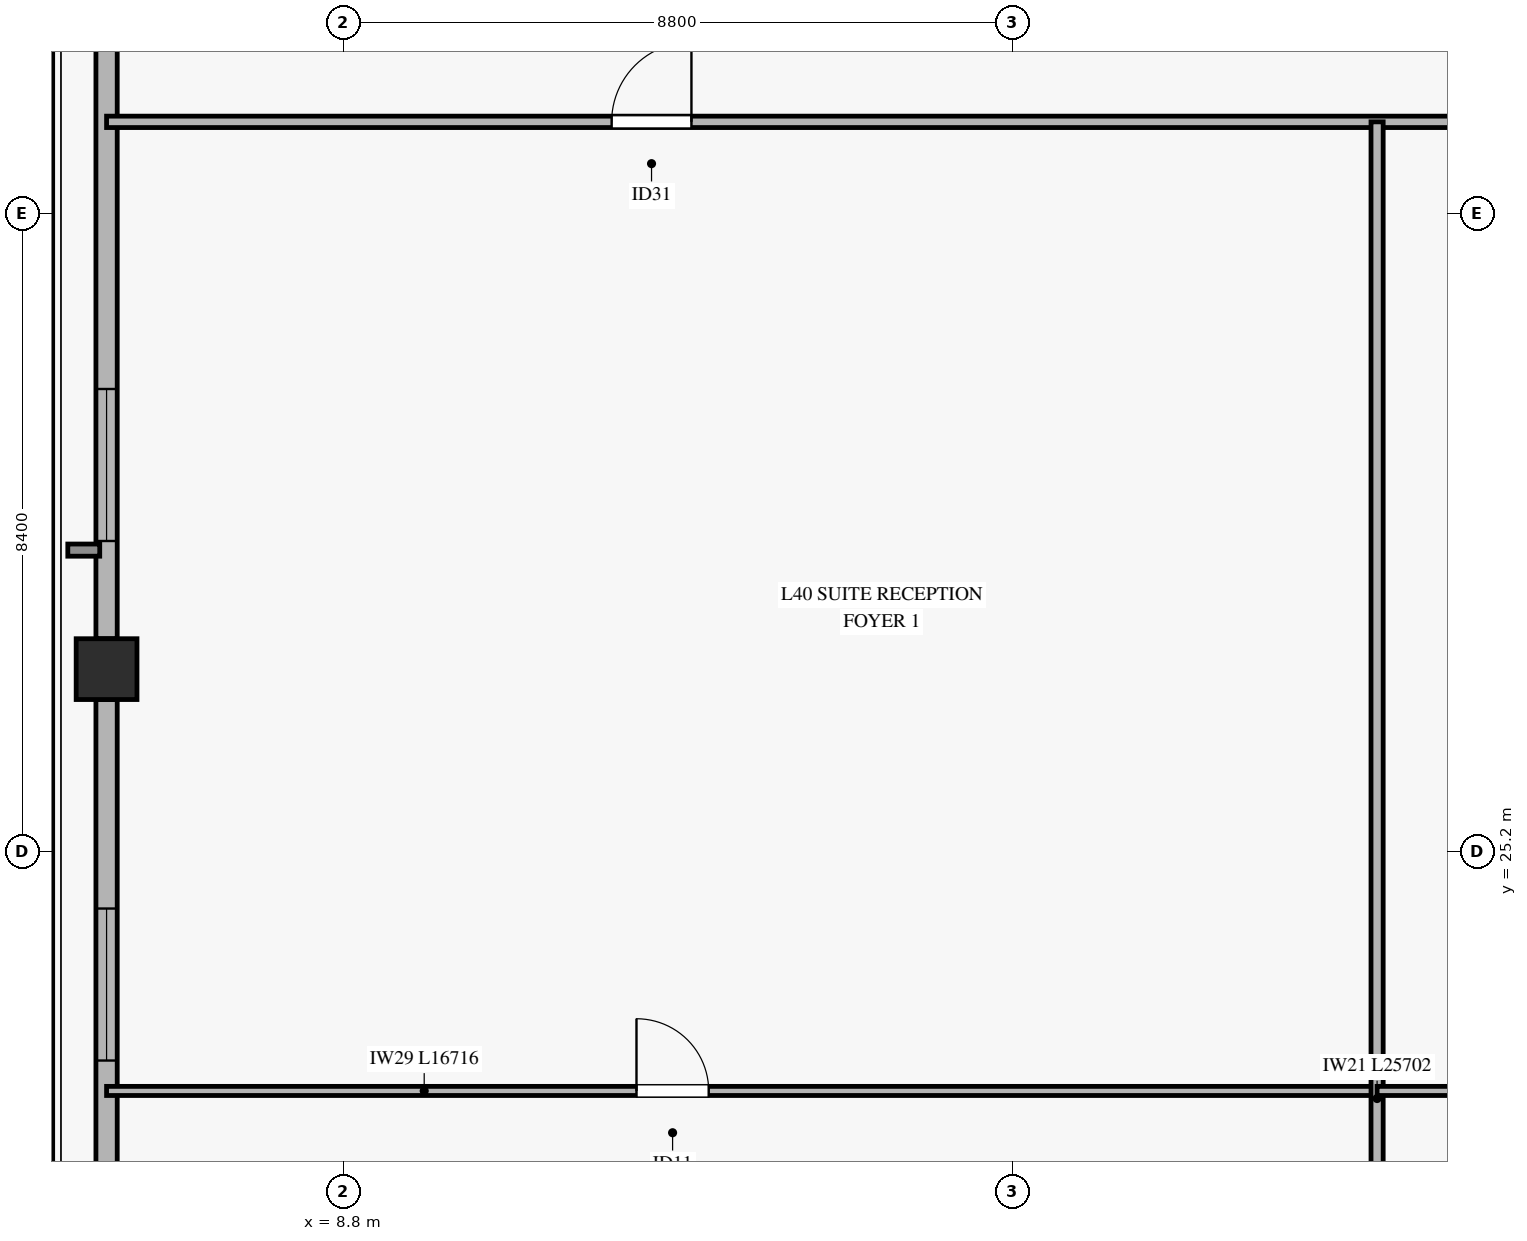
"""IFC4 building model, lengths in metres.
Left out: names, types, materials, properties, quantities, classifications, styles, units other than length and angle.
Written with IfcOpenShell. Run it as: python <this file> out.ifc"""

import sys

from ifc_helpers import new_model, si_unit, direction, frame, frame_2d, origin, origin_2d, place, context, subcontext, project, spatial, rectangle, hollow_rectangle, extrude, source, transform, mapped, element, fill, save


model = new_model("IFC4")
c1 = context("Model", 3, precision=1e-05, world=origin(), true_north=direction((0.0, 1.0)))
c2 = subcontext(c1, "Body", "Model", "MODEL_VIEW")
j1 = project(units=[si_unit("LENGTHUNIT", "METRE"), si_unit("PLANEANGLEUNIT", "RADIAN")], contexts=[c1])
p1 = place(None, origin())
s1 = spatial("IfcSite", under=j1, at=p1, CompositionType="ELEMENT")
p2 = place(p1, origin())
s2 = spatial("IfcBuilding", under=s1, at=p2, CompositionType="ELEMENT")
p3 = place(p2, frame((0.0, 0.0, 163.2)))
s3 = spatial("IfcBuildingStorey", under=s2, at=p3, CompositionType="ELEMENT", Elevation=163.2)
m1 = source(origin(), c2, "Body", "SweptSolid", [
    extrude(hollow_rectangle(XDim=0.8, YDim=0.8, WallThickness=0.036, at=origin_2d()), origin(), (0.0, 0.0, 1.0), 3.27),
])
p4 = place(p3, frame((5.684, 27.599, 0.0), z_axis=(0.0, 0.0, 1.0), x_axis=(1.0, 0.0, 0.0)))
e1 = element("IfcColumn", 1, at=p4, inside=s3, PredefinedType="COLUMN", context=c2, shape_type="MappedRepresentation", body=[
    mapped(m1, transform((0.0, 0.0, 0.0), x_axis=(1.0, 0.0, 0.0), y_axis=(0.0, 1.0, 0.0), z_axis=(0.0, 0.0, 1.0), scale=1.0)),
])
p5 = place(p3, frame((5.684, 12.011, 0.0), z_axis=(0.0, 0.0, 1.0), x_axis=(0.0, 1.0, 0.0)))
e2 = element("IfcWall", 2, at=p5, inside=s3, PredefinedType="SOLIDWALL", context=c2, shape_type="SweptSolid", body=[
    extrude(rectangle(XDim=15.188, YDim=0.28, at=frame_2d((7.594, 0.0))), origin(), (0.0, 0.0, 1.0), 2.75),
])
p6 = place(p5, frame((3.189, 0.0, 0.45)))
e3 = element("IfcOpeningElement", 3, at=p6, cuts=e2, PredefinedType="OPENING", context=c2, shape_type="SweptSolid", body=[
    extrude(rectangle(XDim=2.0, YDim=2.0, at=frame_2d((1.0, 1.0))), frame((0.0, 0.15, 0.0), z_axis=(0.0, -1.0, 0.0), x_axis=(1.0, 0.0, 0.0)), (0.0, 0.0, 1.0), 0.3),
])
p7 = place(p5, frame((10.438, 0.0, 0.45)))
e4 = element("IfcOpeningElement", 4, at=p7, cuts=e2, PredefinedType="OPENING", context=c2, shape_type="SweptSolid", body=[
    extrude(rectangle(XDim=2.0, YDim=2.0, at=frame_2d((1.0, 1.0))), frame((0.0, 0.15, 0.0), z_axis=(0.0, -1.0, 0.0), x_axis=(1.0, 0.0, 0.0)), (0.0, 0.0, 1.0), 0.3),
])
p8 = place(p3, frame((5.684, 27.999, 0.0), z_axis=(0.0, 0.0, 1.0), x_axis=(0.0, 1.0, 0.0)))
e5 = element("IfcWall", 5, at=p8, inside=s3, PredefinedType="SOLIDWALL", context=c2, shape_type="SweptSolid", body=[
    extrude(rectangle(XDim=15.188, YDim=0.28, at=frame_2d((7.594, 0.0))), origin(), (0.0, 0.0, 1.0), 2.75),
])
p9 = place(p8, frame((1.286, 0.0, 0.45)))
e6 = element("IfcOpeningElement", 6, at=p9, cuts=e5, PredefinedType="OPENING", context=c2, shape_type="SweptSolid", body=[
    extrude(rectangle(XDim=2.0, YDim=2.0, at=frame_2d((1.0, 1.0))), frame((0.0, 0.15, 0.0), z_axis=(0.0, -1.0, 0.0), x_axis=(1.0, 0.0, 0.0)), (0.0, 0.0, 1.0), 0.3),
])
p10 = place(p8, frame((11.834, 0.0, 0.45)))
e7 = element("IfcOpeningElement", 7, at=p10, cuts=e5, PredefinedType="OPENING", context=c2, shape_type="SweptSolid", body=[
    extrude(rectangle(XDim=2.0, YDim=2.0, at=frame_2d((1.0, 1.0))), frame((0.0, 0.15, 0.0), z_axis=(0.0, -1.0, 0.0), x_axis=(1.0, 0.0, 0.0)), (0.0, 0.0, 1.0), 0.3),
])
p11 = place(p3, frame((5.684, 34.8, 0.0), z_axis=(0.0, 0.0, 1.0), x_axis=(1.0, 0.0, 0.0)))
e8 = element("IfcWall", 8, at=p11, inside=s3, PredefinedType="PARTITIONING", context=c2, shape_type="SweptSolid", body=[
    extrude(rectangle(XDim=59.032, YDim=0.15, at=frame_2d((29.516, 0.0))), origin(), (0.0, 0.0, 1.0), 2.455),
])
p12 = place(p11, frame((6.645, 0.0, 0.0)))
e9 = element("IfcOpeningElement", 9, at=p12, cuts=e8, PredefinedType="OPENING", context=c2, shape_type="SweptSolid", body=[
    extrude(rectangle(XDim=1.05, YDim=2.15, at=frame_2d((0.525, 1.075))), frame((0.0, 0.085, 0.0), z_axis=(0.0, -1.0, 0.0), x_axis=(1.0, 0.0, 0.0)), (0.0, 0.0, 1.0), 0.17),
])
p13 = place(p11, frame((19.241, 0.0, 0.0)))
e10 = element("IfcOpeningElement", 10, at=p13, cuts=e8, PredefinedType="OPENING", context=c2, shape_type="SweptSolid", body=[
    extrude(rectangle(XDim=1.05, YDim=2.15, at=frame_2d((0.525, 1.075))), frame((0.0, 0.085, 0.0), z_axis=(0.0, -1.0, 0.0), x_axis=(1.0, 0.0, 0.0)), (0.0, 0.0, 1.0), 0.17),
])
p14 = place(p11, frame((25.213, 0.0, 0.0)))
e11 = element("IfcOpeningElement", 11, at=p14, cuts=e8, PredefinedType="OPENING", context=c2, shape_type="SweptSolid", body=[
    extrude(rectangle(XDim=1.05, YDim=2.15, at=frame_2d((0.525, 1.075))), frame((0.0, 0.085, 0.0), z_axis=(0.0, -1.0, 0.0), x_axis=(1.0, 0.0, 0.0)), (0.0, 0.0, 1.0), 0.17),
])
p15 = place(p11, frame((31.086, 0.0, 0.0)))
e12 = element("IfcOpeningElement", 12, at=p15, cuts=e8, PredefinedType="OPENING", context=c2, shape_type="SweptSolid", body=[
    extrude(rectangle(XDim=1.05, YDim=2.15, at=frame_2d((0.525, 1.075))), frame((0.0, 0.085, 0.0), z_axis=(0.0, -1.0, 0.0), x_axis=(1.0, 0.0, 0.0)), (0.0, 0.0, 1.0), 0.17),
])
p16 = place(p11, frame((36.632, 0.0, 0.0)))
e13 = element("IfcOpeningElement", 13, at=p16, cuts=e8, PredefinedType="OPENING", context=c2, shape_type="SweptSolid", body=[
    extrude(rectangle(XDim=1.05, YDim=2.15, at=frame_2d((0.525, 1.075))), frame((0.0, 0.085, 0.0), z_axis=(0.0, -1.0, 0.0), x_axis=(1.0, 0.0, 0.0)), (0.0, 0.0, 1.0), 0.17),
])
p17 = place(p11, frame((47.025, 0.0, 0.0)))
e14 = element("IfcOpeningElement", 14, at=p17, cuts=e8, PredefinedType="OPENING", context=c2, shape_type="SweptSolid", body=[
    extrude(rectangle(XDim=1.05, YDim=2.15, at=frame_2d((0.525, 1.075))), frame((0.0, 0.085, 0.0), z_axis=(0.0, -1.0, 0.0), x_axis=(1.0, 0.0, 0.0)), (0.0, 0.0, 1.0), 0.17),
])
p18 = place(p3, frame((5.684, 22.049, 0.0), z_axis=(0.0, 0.0, 1.0), x_axis=(1.0, 0.0, 0.0)))
e15 = element("IfcWall", 15, at=p18, inside=s3, PredefinedType="PARTITIONING", context=c2, shape_type="SweptSolid", body=[
    extrude(rectangle(XDim=16.716, YDim=0.12, at=frame_2d((8.358, 0.0))), origin(), (0.0, 0.0, 1.0), 2.455),
])
p19 = place(p18, frame((6.972, 0.0, 0.0)))
e16 = element("IfcOpeningElement", 16, at=p19, cuts=e15, PredefinedType="OPENING", context=c2, shape_type="SweptSolid", body=[
    extrude(rectangle(XDim=0.95, YDim=2.1, at=frame_2d((0.475, 1.05))), frame((0.0, 0.07, 0.0), z_axis=(0.0, -1.0, 0.0), x_axis=(1.0, 0.0, 0.0)), (0.0, 0.0, 1.0), 0.14),
])
p20 = place(p3, frame((22.4, 9.098, 0.0), z_axis=(0.0, 0.0, 1.0), x_axis=(0.0, 1.0, 0.0)))
e17 = element("IfcWall", 17, at=p20, inside=s3, PredefinedType="PARTITIONING", context=c2, shape_type="SweptSolid", body=[
    extrude(rectangle(XDim=25.702, YDim=0.16, at=frame_2d((12.851, 0.0))), origin(), (0.0, 0.0, 1.0), 2.755),
])
p21 = place(p3, frame((22.4, 22.049, 0.0), z_axis=(0.0, 0.0, 1.0), x_axis=(1.0, 0.0, 0.0)))
e18 = element("IfcWall", 18, at=p21, inside=s3, PredefinedType="PARTITIONING", context=c2, shape_type="SweptSolid", body=[
    extrude(rectangle(XDim=6.2, YDim=0.12, at=frame_2d((3.1, 0.0))), origin(), (0.0, 0.0, 1.0), 3.27),
])
p22 = place(p21, frame((2.646, 0.0, 0.0)))
e19 = element("IfcOpeningElement", 19, at=p22, cuts=e18, PredefinedType="OPENING", context=c2, shape_type="SweptSolid", body=[
    extrude(rectangle(XDim=0.95, YDim=2.1, at=frame_2d((0.475, 1.05))), frame((0.0, 0.07, 0.0), z_axis=(0.0, -1.0, 0.0), x_axis=(1.0, 0.0, 0.0)), (0.0, 0.0, 1.0), 0.14),
])
m2 = source(origin(), c2, "Body", "SweptSolid", [
    extrude(rectangle(XDim=2.0, YDim=2.0, at=frame_2d((1.0, 1.0))), frame((0.0, 0.03, 0.0), z_axis=(0.0, -1.0, 0.0), x_axis=(1.0, 0.0, 0.0)), (0.0, 0.0, 1.0), 0.06),
])
p23 = place(p7, origin())
e20 = element("IfcWindow", 20, at=p23, inside=s3, PartitioningType="SINGLE_PANEL", PredefinedType="WINDOW", context=c2, shape_type="MappedRepresentation", body=[
    mapped(m2, transform((0.0, 0.0, 0.0), x_axis=(1.0, 0.0, 0.0), y_axis=(0.0, 1.0, 0.0), z_axis=(0.0, 0.0, 1.0), scale=1.0)),
])
fill(e4, e20)
p24 = place(p9, origin())
e21 = element("IfcWindow", 21, at=p24, inside=s3, PartitioningType="SINGLE_PANEL", PredefinedType="WINDOW", context=c2, shape_type="MappedRepresentation", body=[
    mapped(m2, transform((0.0, 0.0, 0.0), x_axis=(1.0, 0.0, 0.0), y_axis=(0.0, 1.0, 0.0), z_axis=(0.0, 0.0, 1.0), scale=1.0)),
])
fill(e6, e21)
m3 = source(origin(), c2, "Body", "SweptSolid", [
    extrude(rectangle(XDim=1.05, YDim=2.15, at=frame_2d((0.525, 1.075))), frame((0.0, 0.025, 0.0), z_axis=(0.0, -1.0, 0.0), x_axis=(1.0, 0.0, 0.0)), (0.0, 0.0, 1.0), 0.05),
])
p25 = place(p12, origin())
e22 = element("IfcDoor", 22, at=p25, inside=s3, OperationType="SINGLE_SWING_RIGHT", PredefinedType="DOOR", context=c2, shape_type="MappedRepresentation", body=[
    mapped(m3, transform((0.0, 0.0, 0.0), x_axis=(1.0, 0.0, 0.0), y_axis=(0.0, 1.0, 0.0), z_axis=(0.0, 0.0, 1.0), scale=1.0)),
])
fill(e9, e22)
m4 = source(origin(), c2, "Body", "SweptSolid", [
    extrude(rectangle(XDim=0.95, YDim=2.1, at=frame_2d((0.475, 1.05))), frame((0.0, 0.025, 0.0), z_axis=(0.0, -1.0, 0.0), x_axis=(1.0, 0.0, 0.0)), (0.0, 0.0, 1.0), 0.05),
])
p26 = place(p19, origin())
e23 = element("IfcDoor", 23, at=p26, inside=s3, OperationType="SINGLE_SWING_LEFT", PredefinedType="DOOR", context=c2, shape_type="MappedRepresentation", body=[
    mapped(m4, transform((0.0, 0.0, 0.0), x_axis=(1.0, 0.0, 0.0), y_axis=(0.0, 1.0, 0.0), z_axis=(0.0, 0.0, 1.0), scale=1.0)),
])
fill(e16, e23)
save(model, sys.argv[1])
